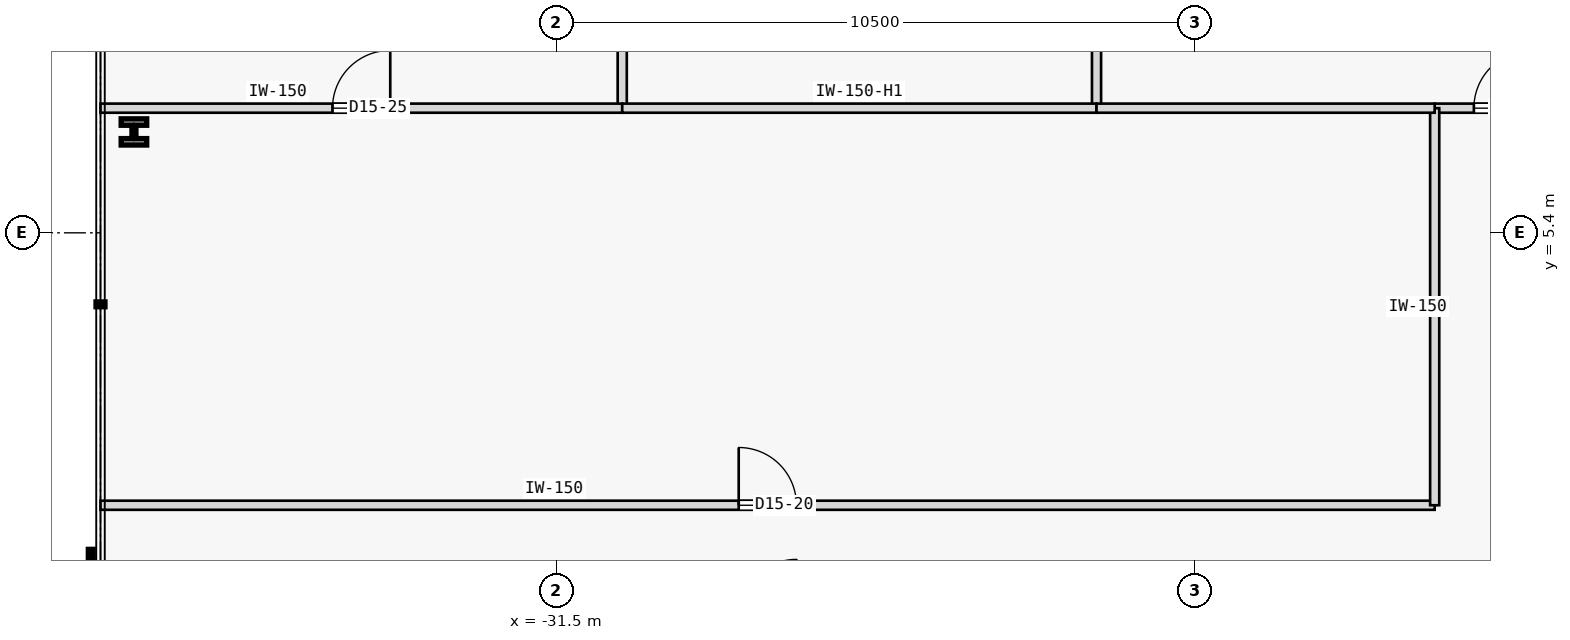
"""IFC4 building model, lengths in metres.
Left out: names, types, materials, properties, quantities, classifications, styles, units other than length and angle.
Written with IfcOpenShell. Run it as: python <this file> out.ifc"""

import sys

from ifc_helpers import new_model, si_unit, direction, frame, frame_2d, origin, origin_2d, place, context, subcontext, project, spatial, rectangle, i_section, extrude, element, fill, save


model = new_model("IFC4")
c1 = context("Model", 3, precision=1e-05, world=origin(), true_north=direction((0.0, 1.0)))
c2 = subcontext(c1, "Body", "Model", "MODEL_VIEW")
j1 = project(units=[si_unit("LENGTHUNIT", "METRE"), si_unit("PLANEANGLEUNIT", "RADIAN")], contexts=[c1])
p1 = place(None, origin())
s1 = spatial("IfcSite", under=j1, at=p1, CompositionType="ELEMENT")
p2 = place(p1, origin())
s2 = spatial("IfcBuilding", under=s1, at=p2, CompositionType="ELEMENT")
p3 = place(p2, frame((0.0, 0.0, 63.6)))
s3 = spatial("IfcBuildingStorey", under=s2, at=p3, CompositionType="ELEMENT", Elevation=63.6)
p4 = place(p3, frame((-38.45, 7.059, 0.0), z_axis=(0.0, 0.0, 1.0), x_axis=(1.0, 0.0, 0.0)))
e1 = element("IfcColumn", 1, at=p4, inside=s3, PredefinedType="COLUMN", context=c2, shape_type="SweptSolid", body=[
    extrude(i_section(OverallWidth=0.42, OverallDepth=0.431, WebThickness=0.065, FlangeThickness=0.106, FilletRadius=0.015, at=origin_2d()), origin(), (0.0, 0.0, 1.0), 3.8),
])
p5 = place(p3, frame((-17.059, 7.45, 0.0), z_axis=(0.0, 0.0, 1.0), x_axis=(1.0, 0.0, 0.0)))
e2 = element("IfcWall", 2, at=p5, inside=s3, PredefinedType="PARTITIONING", context=c2, shape_type="SweptSolid", body=[
    extrude(rectangle(XDim=2.239, YDim=0.15, at=frame_2d((1.12, 0.0))), origin(), (0.0, 0.0, 1.0), 3.575),
])
p6 = place(p5, frame((0.645, 0.0, 0.0)))
e3 = element("IfcOpeningElement", 3, at=p6, cuts=e2, PredefinedType="OPENING", context=c2, shape_type="SweptSolid", body=[
    extrude(rectangle(XDim=0.95, YDim=2.15, at=frame_2d((0.475, 1.075))), frame((0.0, 0.085, 0.0), z_axis=(0.0, -1.0, 0.0), x_axis=(1.0, 0.0, 0.0)), (0.0, 0.0, 1.0), 0.17),
])
p7 = place(p3, frame((-39.0, 0.92, 0.0), z_axis=(0.0, 0.0, 1.0), x_axis=(1.0, 0.0, 0.0)))
e4 = element("IfcWall", 4, at=p7, inside=s3, PredefinedType="PARTITIONING", context=c2, shape_type="SweptSolid", body=[
    extrude(rectangle(XDim=21.941, YDim=0.15, at=frame_2d((10.97, 0.0))), origin(), (0.0, 0.0, 1.0), 3.575),
])
p8 = place(p7, frame((10.496, 0.0, 0.0)))
e5 = element("IfcOpeningElement", 5, at=p8, cuts=e4, PredefinedType="OPENING", context=c2, shape_type="SweptSolid", body=[
    extrude(rectangle(XDim=0.95, YDim=2.15, at=frame_2d((0.475, 1.075))), frame((0.0, 0.085, 0.0), z_axis=(0.0, -1.0, 0.0), x_axis=(1.0, 0.0, 0.0)), (0.0, 0.0, 1.0), 0.17),
])
p9 = place(p3, frame((-17.059, 0.92, 0.0), z_axis=(0.0, 0.0, 1.0), x_axis=(0.0, 1.0, 0.0)))
e6 = element("IfcWall", 6, at=p9, inside=s3, PredefinedType="PARTITIONING", context=c2, shape_type="SweptSolid", body=[
    extrude(rectangle(XDim=6.53, YDim=0.15, at=frame_2d((3.265, 0.0))), origin(), (0.0, 0.0, 1.0), 3.575),
])
p10 = place(p3, frame((-30.42, 7.45, 0.0), z_axis=(0.0, 0.0, 1.0), x_axis=(0.0, 1.0, 0.0)))
e7 = element("IfcWall", 7, at=p10, inside=s3, PredefinedType="PARTITIONING", context=c2, shape_type="SweptSolid", body=[
    extrude(rectangle(XDim=17.55, YDim=0.15, at=frame_2d((8.775, 0.0))), origin(), (0.0, 0.0, 1.0), 3.575),
])
p11 = place(p10, frame((8.3, 0.0, 0.0)))
e8 = element("IfcOpeningElement", 8, at=p11, cuts=e7, PredefinedType="OPENING", context=c2, shape_type="SweptSolid", body=[
    extrude(rectangle(XDim=0.95, YDim=2.15, at=frame_2d((0.475, 1.075))), frame((0.0, 0.085, 0.0), z_axis=(0.0, -1.0, 0.0), x_axis=(1.0, 0.0, 0.0)), (0.0, 0.0, 1.0), 0.17),
])
p12 = place(p3, frame((-39.0, 7.45, 0.0), z_axis=(0.0, 0.0, 1.0), x_axis=(1.0, 0.0, 0.0)))
e9 = element("IfcWall", 9, at=p12, inside=s3, PredefinedType="PARTITIONING", context=c2, shape_type="SweptSolid", body=[
    extrude(rectangle(XDim=8.58, YDim=0.15, at=frame_2d((4.29, 0.0))), origin(), (0.0, 0.0, 1.0), 3.575),
])
p13 = place(p12, frame((3.815, 0.0, 0.0)))
e10 = element("IfcOpeningElement", 10, at=p13, cuts=e9, PredefinedType="OPENING", context=c2, shape_type="SweptSolid", body=[
    extrude(rectangle(XDim=0.95, YDim=2.15, at=frame_2d((0.475, 1.075))), frame((0.0, 0.085, 0.0), z_axis=(0.0, -1.0, 0.0), x_axis=(1.0, 0.0, 0.0)), (0.0, 0.0, 1.0), 0.17),
])
p14 = place(p3, frame((-22.62, 7.45, 0.0), z_axis=(0.0, 0.0, 1.0), x_axis=(0.0, 1.0, 0.0)))
e11 = element("IfcWall", 11, at=p14, inside=s3, PredefinedType="PARTITIONING", context=c2, shape_type="SweptSolid", body=[
    extrude(rectangle(XDim=17.55, YDim=0.15, at=frame_2d((8.775, 0.0))), origin(), (0.0, 0.0, 1.0), 3.575),
])
p15 = place(p3, frame((-30.42, 7.45, 0.0), z_axis=(0.0, 0.0, 1.0), x_axis=(1.0, 0.0, 0.0)))
e12 = element("IfcWall", 12, at=p15, inside=s3, PredefinedType="PARTITIONING", context=c2, shape_type="SweptSolid", body=[
    extrude(rectangle(XDim=7.8, YDim=0.15, at=frame_2d((3.9, 0.0))), origin(), (0.0, 0.0, 1.0), 3.125),
])
p16 = place(p3, frame((-22.62, 7.45, 0.0), z_axis=(0.0, 0.0, 1.0), x_axis=(1.0, 0.0, 0.0)))
e13 = element("IfcWall", 13, at=p16, inside=s3, PredefinedType="PARTITIONING", context=c2, shape_type="SweptSolid", body=[
    extrude(rectangle(XDim=5.561, YDim=0.15, at=frame_2d((2.781, 0.0))), origin(), (0.0, 0.0, 1.0), 3.575),
])
p17 = place(p6, origin())
e14 = element("IfcDoor", 14, at=p17, inside=s3, OperationType="SINGLE_SWING_RIGHT", PredefinedType="DOOR", context=c2, shape_type="SweptSolid", body=[
    extrude(rectangle(XDim=0.95, YDim=2.15, at=frame_2d((0.475, 1.075))), frame((0.0, 0.025, 0.0), z_axis=(0.0, -1.0, 0.0), x_axis=(1.0, 0.0, 0.0)), (0.0, 0.0, 1.0), 0.05),
])
fill(e3, e14)
p18 = place(p8, origin())
e15 = element("IfcDoor", 15, at=p18, inside=s3, OperationType="SINGLE_SWING_LEFT", PredefinedType="DOOR", context=c2, shape_type="SweptSolid", body=[
    extrude(rectangle(XDim=0.95, YDim=2.15, at=frame_2d((0.475, 1.075))), frame((0.0, 0.025, 0.0), z_axis=(0.0, -1.0, 0.0), x_axis=(1.0, 0.0, 0.0)), (0.0, 0.0, 1.0), 0.05),
])
fill(e5, e15)
p19 = place(p13, origin())
e16 = element("IfcDoor", 16, at=p19, inside=s3, OperationType="SINGLE_SWING_RIGHT", PredefinedType="DOOR", context=c2, shape_type="SweptSolid", body=[
    extrude(rectangle(XDim=0.95, YDim=2.15, at=frame_2d((0.475, 1.075))), frame((0.0, 0.025, 0.0), z_axis=(0.0, -1.0, 0.0), x_axis=(1.0, 0.0, 0.0)), (0.0, 0.0, 1.0), 0.05),
])
fill(e10, e16)
save(model, sys.argv[1])
